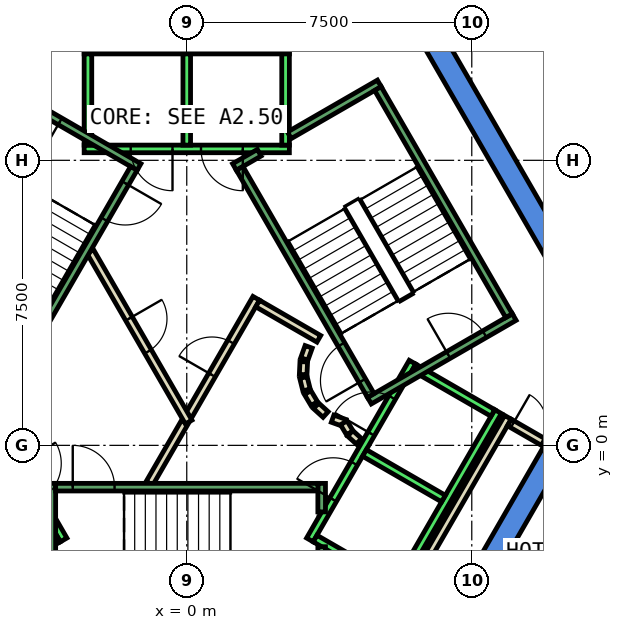
"""IFC4 building model, lengths in metres.
Left out: names, types, materials, properties, quantities, classifications, styles, units other than length and angle.
Written with IfcOpenShell. Run it as: python <this file> out.ifc"""

import sys

from ifc_helpers import new_model, si_unit, direction, frame, frame_2d, origin, place, context, subcontext, project, spatial, polyline, rectangle, outline, extrude, element, fill, save


model = new_model("IFC4")
c1 = context("Model", 3, precision=1e-05, world=origin(), true_north=direction((0.0, 1.0)))
c2 = subcontext(c1, "Body", "Model", "MODEL_VIEW")
j1 = project(units=[si_unit("LENGTHUNIT", "METRE"), si_unit("PLANEANGLEUNIT", "RADIAN")], contexts=[c1])
p1 = place(None, origin())
s1 = spatial("IfcSite", under=j1, at=p1, CompositionType="ELEMENT")
p2 = place(p1, origin())
s2 = spatial("IfcBuilding", under=s1, at=p2, CompositionType="ELEMENT")
p3 = place(p2, frame((0.0, 0.0, 241.4)))
s3 = spatial("IfcBuildingStorey", under=s2, at=p3, CompositionType="ELEMENT", Elevation=241.4)
p4 = place(p3, frame((0.0, 0.0, -0.6)))
e1 = element("IfcWall", 1, at=p4, inside=s3, PredefinedType="SHEAR", context=c2, shape_type="SweptSolid", body=[
    extrude(outline(polyline([(6.786, 10.747), (6.266, 10.447), (10.854, 2.5), (11.547, 2.5), (6.786, 10.747)])), origin(), (0.0, 0.0, 1.0), 3.86),
])
p5 = place(p3, frame((0.0, 0.0, -0.6)))
e2 = element("IfcWall", 2, at=p5, inside=s3, PredefinedType="SHEAR", context=c2, shape_type="SweptSolid", body=[
    extrude(outline(polyline([(5.774, -7.5), (11.547, 2.5), (10.854, 2.5), (5.427, -6.9), (5.774, -7.5)])), origin(), (0.0, 0.0, 1.0), 3.86),
])
p6 = place(p3, frame((8.939, 12.559, 0.0), z_axis=(0.0, 0.0, 1.0), x_axis=(0.517045022441, -0.855958202699, 0.0)))
e3 = element("IfcWall", 3, at=p6, inside=s3, PredefinedType="PARTITIONING", context=c2, shape_type="SweptSolid", body=[
    extrude(rectangle(XDim=3.166, YDim=0.2, at=frame_2d((1.583, 0.0))), origin(), (0.0, 0.0, 1.0), 3.26),
])
p7 = place(p6, frame((1.083, 0.0, 0.0)))
e4 = element("IfcOpeningElement", 4, at=p7, cuts=e3, PredefinedType="OPENING", context=c2, shape_type="SweptSolid", body=[
    extrude(rectangle(XDim=1.0, YDim=2.1, at=frame_2d((0.5, 1.05))), frame((0.0, 0.11, 0.0), z_axis=(0.0, -1.0, 0.0), x_axis=(1.0, 0.0, 0.0)), (0.0, 0.0, 1.0), 0.22),
])
p8 = place(p3, frame((5.751, -3.938, 0.0), z_axis=(0.0, 0.0, 1.0), x_axis=(0.500034260056, 0.866005622828, 0.0)))
e5 = element("IfcWall", 5, at=p8, inside=s3, PredefinedType="PARTITIONING", context=c2, shape_type="SweptSolid", body=[
    extrude(rectangle(XDim=5.399, YDim=0.2, at=frame_2d((2.7, 0.0))), origin(), (0.0, 0.0, 1.0), 3.26),
])
p9 = place(p3, frame((8.488, 0.602, 0.0), z_axis=(0.0, 0.0, 1.0), x_axis=(0.866063652425, -0.499933745558, 0.0)))
e6 = element("IfcWall", 6, at=p9, inside=s3, PredefinedType="PARTITIONING", context=c2, shape_type="SweptSolid", body=[
    extrude(rectangle(XDim=1.1, YDim=0.2, at=frame_2d((0.55, 0.0))), origin(), (0.0, 0.0, 1.0), 3.26),
])
p10 = place(p9, frame((0.1, 0.0, 0.0)))
e7 = element("IfcOpeningElement", 7, at=p10, cuts=e6, PredefinedType="OPENING", context=c2, shape_type="SweptSolid", body=[
    extrude(rectangle(XDim=0.9, YDim=2.1, at=frame_2d((0.45, 1.05))), frame((0.0, 0.11, 0.0), z_axis=(0.0, -1.0, 0.0), x_axis=(1.0, 0.0, 0.0)), (0.0, 0.0, 1.0), 0.22),
])
p11 = place(p3, frame((9.358, -4.692, 0.0), z_axis=(0.0, 0.0, 1.0), x_axis=(0.500027777314, 0.866009365951, 0.0)))
e8 = element("IfcWall", 8, at=p11, inside=s3, PredefinedType="PARTITIONING", context=c2, shape_type="SweptSolid", body=[
    extrude(rectangle(XDim=7.36, YDim=0.15, at=frame_2d((3.68, 0.0))), origin(), (0.0, 0.0, 1.0), 3.26),
])
p12 = place(p3, frame((-0.982, -1.0, 0.0), z_axis=(0.0, 0.0, 1.0), x_axis=(0.50024047865, 0.865886518847, 0.0)))
e9 = element("IfcWall", 9, at=p12, inside=s3, PredefinedType="PARTITIONING", context=c2, shape_type="SweptSolid", body=[
    extrude(rectangle(XDim=1.863, YDim=0.2, at=frame_2d((0.931, 0.0))), origin(), (0.0, 0.0, 1.0), 3.26),
])
p13 = place(p3, frame((0.05, 0.787, 0.0), z_axis=(0.0, 0.0, 1.0), x_axis=(0.499954076797, 0.866051915934, 0.0)))
e10 = element("IfcWall", 10, at=p13, inside=s3, PredefinedType="PARTITIONING", context=c2, shape_type="SweptSolid", body=[
    extrude(rectangle(XDim=3.558, YDim=0.2, at=frame_2d((1.779, 0.0))), origin(), (0.0, 0.0, 1.0), 3.26),
])
p14 = place(p13, frame((1.229, 0.0, 0.0)))
e11 = element("IfcOpeningElement", 11, at=p14, cuts=e10, PredefinedType="OPENING", context=c2, shape_type="SweptSolid", body=[
    extrude(rectangle(XDim=1.0, YDim=2.1, at=frame_2d((0.5, 1.05))), frame((0.0, 0.11, 0.0), z_axis=(0.0, -1.0, 0.0), x_axis=(1.0, 0.0, 0.0)), (0.0, 0.0, 1.0), 0.22),
])
p15 = place(p3, frame((1.866, 3.732, 0.0), z_axis=(0.0, 0.0, 1.0), x_axis=(0.866043361281, -0.499968895414, 0.0)))
e12 = element("IfcWall", 12, at=p15, inside=s3, PredefinedType="PARTITIONING", context=c2, shape_type="SweptSolid", body=[
    extrude(rectangle(XDim=1.858, YDim=0.2, at=frame_2d((0.929, 0.0))), origin(), (0.0, 0.0, 1.0), 3.26),
])
p16 = place(p3, frame((3.208, 2.592, 0.0), z_axis=(0.0, 0.0, 1.0), x_axis=(-0.337388820924, -0.941365382578, 0.0)))
e13 = element("IfcWall", 13, at=p16, inside=s3, PredefinedType="PARTITIONING", context=c2, shape_type="SweptSolid", body=[
    extrude(rectangle(XDim=0.338, YDim=0.2, at=frame_2d((0.169, 0.0))), origin(), (0.0, 0.0, 1.0), 3.26),
])
p17 = place(p3, frame((3.079, 2.199, 0.0), z_axis=(0.0, 0.0, 1.0), x_axis=(-0.047771483479, -0.998858290933, 0.0)))
e14 = element("IfcWall", 14, at=p17, inside=s3, PredefinedType="PARTITIONING", context=c2, shape_type="SweptSolid", body=[
    extrude(rectangle(XDim=0.337, YDim=0.2, at=frame_2d((0.169, 0.0))), origin(), (0.0, 0.0, 1.0), 3.26),
])
p18 = place(p3, frame((3.07, 1.786, 0.0), z_axis=(0.0, 0.0, 1.0), x_axis=(0.242705583207, -0.970099994784, 0.0)))
e15 = element("IfcWall", 15, at=p18, inside=s3, PredefinedType="PARTITIONING", context=c2, shape_type="SweptSolid", body=[
    extrude(rectangle(XDim=0.338, YDim=0.2, at=frame_2d((0.169, 0.0))), origin(), (0.0, 0.0, 1.0), 3.26),
])
for number, where, z_axis, x_axis in (
    (16, (3.182, 1.388, 0.0), (0.0, 0.0, 1.0), (0.512, -0.859, 0.0)),
    (17, (3.404, 1.039, 0.0), (0.0, 0.0, 1.0), (0.74, -0.672, 0.0)),
):
    element("IfcWall", number, at=place(p3, frame(where, z_axis=z_axis, x_axis=x_axis)), inside=s3, PredefinedType="PARTITIONING", context=c2, shape_type="SweptSolid", body=[
        extrude(rectangle(XDim=0.338, YDim=0.2, at=frame_2d((0.169, 0.0))), origin(), (0.0, 0.0, 1.0), 3.26),
    ])
p19 = place(p3, frame((3.838, 0.702, 0.0), z_axis=(0.0, 0.0, 1.0), x_axis=(0.941035081519, -0.338308993895, 0.0)))
e18 = element("IfcWall", 18, at=p19, inside=s3, PredefinedType="PARTITIONING", context=c2, shape_type="SweptSolid", body=[
    extrude(rectangle(XDim=0.337, YDim=0.2, at=frame_2d((0.168, 0.0))), origin(), (0.0, 0.0, 1.0), 3.26),
])
p20 = place(p3, frame((4.132, 0.593, 0.0), z_axis=(0.0, 0.0, 1.0), x_axis=(0.513561617048, -0.858052717201, 0.0)))
e19 = element("IfcWall", 19, at=p20, inside=s3, PredefinedType="PARTITIONING", context=c2, shape_type="SweptSolid", body=[
    extrude(rectangle(XDim=0.308, YDim=0.2, at=frame_2d((0.154, 0.0))), origin(), (0.0, 0.0, 1.0), 3.26),
])
p21 = place(p3, frame((4.301, 0.315, 0.0), z_axis=(0.0, 0.0, 1.0), x_axis=(0.741798017506, -0.670623367639, 0.0)))
e20 = element("IfcWall", 20, at=p21, inside=s3, PredefinedType="PARTITIONING", context=c2, shape_type="SweptSolid", body=[
    extrude(rectangle(XDim=0.309, YDim=0.2, at=frame_2d((0.154, 0.0))), origin(), (0.0, 0.0, 1.0), 3.26),
])
p22 = place(p3, frame((-2.54, 5.1, 0.0), z_axis=(0.0, 0.0, 1.0), x_axis=(0.499925051871, -0.866068670783, 0.0)))
e21 = element("IfcWall", 21, at=p22, inside=s3, PredefinedType="PARTITIONING", context=c2, shape_type="SweptSolid", body=[
    extrude(rectangle(XDim=5.181, YDim=0.2, at=frame_2d((2.59, 0.0))), origin(), (0.0, 0.0, 1.0), 3.26),
])
p23 = place(p22, frame((2.04, 0.0, 0.0)))
e22 = element("IfcOpeningElement", 22, at=p23, cuts=e21, PredefinedType="OPENING", context=c2, shape_type="SweptSolid", body=[
    extrude(rectangle(XDim=1.0, YDim=2.1, at=frame_2d((0.5, 1.05))), frame((0.0, 0.11, 0.0), z_axis=(0.0, -1.0, 0.0), x_axis=(1.0, 0.0, 0.0)), (0.0, 0.0, 1.0), 0.22),
])
p24 = place(p3, frame((2.7, 7.8, 0.0), z_axis=(0.0, 0.0, 1.0), x_axis=(-1.0, 0.0, 0.0)))
e23 = element("IfcWall", 23, at=p24, inside=s3, PredefinedType="STANDARD", context=c2, shape_type="SweptSolid", body=[
    extrude(rectangle(XDim=5.4, YDim=0.2, at=frame_2d((2.7, 0.0))), origin(), (0.0, 0.0, 1.0), 3.26),
])
p25 = place(p24, frame((1.225, 0.0, 0.0)))
e24 = element("IfcOpeningElement", 24, at=p25, cuts=e23, PredefinedType="OPENING", context=c2, shape_type="SweptSolid", body=[
    extrude(rectangle(XDim=1.1, YDim=2.1, at=frame_2d((0.55, 1.05))), frame((0.0, 0.11, 0.0), z_axis=(0.0, -1.0, 0.0), x_axis=(1.0, 0.0, 0.0)), (0.0, 0.0, 1.0), 0.22),
])
p26 = place(p24, frame((3.075, 0.0, 0.0)))
e25 = element("IfcOpeningElement", 25, at=p26, cuts=e23, PredefinedType="OPENING", context=c2, shape_type="SweptSolid", body=[
    extrude(rectangle(XDim=1.1, YDim=2.1, at=frame_2d((0.55, 1.05))), frame((0.0, 0.11, 0.0), z_axis=(0.0, -1.0, 0.0), x_axis=(1.0, 0.0, 0.0)), (0.0, 0.0, 1.0), 0.22),
])
p27 = place(p3, frame((2.7, 10.4, 0.0), z_axis=(0.0, 0.0, 1.0), x_axis=(-1.0, 0.0, 0.0)))
e26 = element("IfcWall", 26, at=p27, inside=s3, PredefinedType="STANDARD", context=c2, shape_type="SweptSolid", body=[
    extrude(rectangle(XDim=5.4, YDim=0.2, at=frame_2d((2.7, 0.0))), origin(), (0.0, 0.0, 1.0), 3.26),
])
for number, where, z_axis, x_axis in (
    (27, (2.6, 7.9, 0.0), (0.0, 0.0, 1.0), (0.0, 1.0, 0.0)),
    (28, (0.0, 7.9, 0.0), (0.0, 0.0, 1.0), (0.0, 1.0, 0.0)),
    (29, (-2.6, 7.9, 0.0), (0.0, 0.0, 1.0), (0.0, 1.0, 0.0)),
):
    element("IfcWall", number, at=place(p3, frame(where, z_axis=z_axis, x_axis=x_axis)), inside=s3, PredefinedType="STANDARD", context=c2, shape_type="SweptSolid", body=[
        extrude(rectangle(XDim=2.4, YDim=0.2, at=frame_2d((1.2, 0.0))), origin(), (0.0, 0.0, 1.0), 3.26),
    ])
p28 = place(p3, frame((-5.94, 2.188, 0.0), z_axis=(0.0, 0.0, 1.0), x_axis=(0.500034260056, -0.866005622828, 0.0)))
e30 = element("IfcWall", 30, at=p28, inside=s3, PredefinedType="STANDARD", context=c2, shape_type="SweptSolid", body=[
    extrude(rectangle(XDim=5.399, YDim=0.2, at=frame_2d((2.7, 0.0))), origin(), (0.0, 0.0, 1.0), 3.26),
])
p29 = place(p28, frame((3.075, 0.0, 0.0)))
e31 = element("IfcOpeningElement", 31, at=p29, cuts=e30, PredefinedType="OPENING", context=c2, shape_type="SweptSolid", body=[
    extrude(rectangle(XDim=1.1, YDim=2.1, at=frame_2d((0.55, 1.05))), frame((0.0, 0.11, 0.0), z_axis=(0.0, -1.0, 0.0), x_axis=(1.0, 0.0, 0.0)), (0.0, 0.0, 1.0), 0.22),
])
p30 = place(p28, frame((1.225, 0.0, 0.0)))
e32 = element("IfcOpeningElement", 32, at=p30, cuts=e30, PredefinedType="OPENING", context=c2, shape_type="SweptSolid", body=[
    extrude(rectangle(XDim=1.1, YDim=2.1, at=frame_2d((0.55, 1.05))), frame((0.0, 0.11, 0.0), z_axis=(0.0, -1.0, 0.0), x_axis=(1.0, 0.0, 0.0)), (0.0, 0.0, 1.0), 0.22),
])
p31 = place(p3, frame((-3.377, -2.452, 0.0), z_axis=(0.0, 0.0, 1.0), x_axis=(-0.865955154139, -0.50012165622, 0.0)))
e33 = element("IfcWall", 33, at=p31, inside=s3, PredefinedType="STANDARD", context=c2, shape_type="SweptSolid", body=[
    extrude(rectangle(XDim=2.4, YDim=0.2, at=frame_2d((1.2, 0.0))), origin(), (0.0, 0.0, 1.0), 3.26),
])
p32 = place(p3, frame((3.24, -2.488, 0.0), z_axis=(0.0, 0.0, 1.0), x_axis=(0.500034260056, 0.866005622828, 0.0)))
e34 = element("IfcWall", 34, at=p32, inside=s3, PredefinedType="STANDARD", context=c2, shape_type="SweptSolid", body=[
    extrude(rectangle(XDim=5.399, YDim=0.2, at=frame_2d((2.7, 0.0))), origin(), (0.0, 0.0, 1.0), 3.26),
])
p33 = place(p32, frame((3.225, 0.0, 0.0)))
e35 = element("IfcOpeningElement", 35, at=p33, cuts=e34, PredefinedType="OPENING", context=c2, shape_type="SweptSolid", body=[
    extrude(rectangle(XDim=1.1, YDim=2.1, at=frame_2d((0.55, 1.05))), frame((0.0, 0.11, 0.0), z_axis=(0.0, -1.0, 0.0), x_axis=(1.0, 0.0, 0.0)), (0.0, 0.0, 1.0), 0.22),
])
p34 = place(p32, frame((1.225, 0.0, 0.0)))
e36 = element("IfcOpeningElement", 36, at=p34, cuts=e34, PredefinedType="OPENING", context=c2, shape_type="SweptSolid", body=[
    extrude(rectangle(XDim=1.1, YDim=2.1, at=frame_2d((0.55, 1.05))), frame((0.0, 0.11, 0.0), z_axis=(0.0, -1.0, 0.0), x_axis=(1.0, 0.0, 0.0)), (0.0, 0.0, 1.0), 0.22),
])
p35 = place(p3, frame((5.492, -3.788, 0.0), z_axis=(0.0, 0.0, 1.0), x_axis=(0.500034260056, 0.866005622828, 0.0)))
e37 = element("IfcWall", 37, at=p35, inside=s3, PredefinedType="STANDARD", context=c2, shape_type="SweptSolid", body=[
    extrude(rectangle(XDim=5.399, YDim=0.2, at=frame_2d((2.7, 0.0))), origin(), (0.0, 0.0, 1.0), 3.26),
])
p36 = place(p3, frame((3.377, -2.452, 0.0), z_axis=(0.0, 0.0, 1.0), x_axis=(0.865955154139, -0.50012165622, 0.0)))
e38 = element("IfcWall", 38, at=p36, inside=s3, PredefinedType="STANDARD", context=c2, shape_type="SweptSolid", body=[
    extrude(rectangle(XDim=2.4, YDim=0.2, at=frame_2d((1.2, 0.0))), origin(), (0.0, 0.0, 1.0), 3.26),
])
for number, where, z_axis, x_axis in (
    (39, (4.677, -0.2, 0.0), (0.0, 0.0, 1.0), (0.866, -0.5, 0.0)),
    (40, (5.977, 2.052, 0.0), (0.0, 0.0, 1.0), (0.866, -0.5, 0.0)),
):
    element("IfcWall", number, at=place(p3, frame(where, z_axis=z_axis, x_axis=x_axis)), inside=s3, PredefinedType="STANDARD", context=c2, shape_type="SweptSolid", body=[
        extrude(rectangle(XDim=2.399, YDim=0.2, at=frame_2d((1.2, 0.0))), origin(), (0.0, 0.0, 1.0), 3.26),
    ])
p37 = place(p3, frame((-3.55, -1.0, 0.0), z_axis=(0.0, 0.0, 1.0), x_axis=(0.0, -1.0, 0.0)))
e41 = element("IfcWall", 41, at=p37, inside=s3, PredefinedType="STANDARD", context=c2, shape_type="SweptSolid", body=[
    extrude(rectangle(XDim=4.4, YDim=0.2, at=frame_2d((2.2, 0.0))), origin(), (0.0, 0.0, 1.0), 3.26),
])
p38 = place(p37, frame((2.4, 0.0, 0.0)))
e42 = element("IfcOpeningElement", 42, at=p38, cuts=e41, PredefinedType="OPENING", context=c2, shape_type="SweptSolid", body=[
    extrude(rectangle(XDim=1.1, YDim=2.2, at=frame_2d((0.55, 1.1))), frame((0.0, 0.11, 0.0), z_axis=(0.0, -1.0, 0.0), x_axis=(1.0, 0.0, 0.0)), (0.0, 0.0, 1.0), 0.22),
])
p39 = place(p3, frame((3.55, -2.667, 0.0), z_axis=(0.0, 0.0, 1.0), x_axis=(0.0, -1.0, 0.0)))
e43 = element("IfcWall", 43, at=p39, inside=s3, PredefinedType="STANDARD", context=c2, shape_type="SweptSolid", body=[
    extrude(rectangle(XDim=2.733, YDim=0.2, at=frame_2d((1.366, 0.0))), origin(), (0.0, 0.0, 1.0), 3.26),
])
p40 = place(p3, frame((3.55, -1.0, 0.0), z_axis=(0.0, 0.0, 1.0), x_axis=(0.0, -1.0, 0.0)))
e44 = element("IfcWall", 44, at=p40, inside=s3, PredefinedType="STANDARD", context=c2, shape_type="SweptSolid", body=[
    extrude(rectangle(XDim=0.751, YDim=0.2, at=frame_2d((0.375, 0.0))), origin(), (0.0, 0.0, 1.0), 3.26),
])
p41 = place(p3, frame((-3.45, -1.1, 0.0), z_axis=(0.0, 0.0, 1.0), x_axis=(1.0, 0.0, 0.0)))
e45 = element("IfcWall", 45, at=p41, inside=s3, PredefinedType="STANDARD", context=c2, shape_type="SweptSolid", body=[
    extrude(rectangle(XDim=6.9, YDim=0.2, at=frame_2d((3.45, 0.0))), origin(), (0.0, 0.0, 1.0), 3.26),
])
p42 = place(p41, frame((0.45, 0.0, 0.0)))
e46 = element("IfcOpeningElement", 46, at=p42, cuts=e45, PredefinedType="OPENING", context=c2, shape_type="SweptSolid", body=[
    extrude(rectangle(XDim=1.1, YDim=2.2, at=frame_2d((0.55, 1.1))), frame((0.0, 0.11, 0.0), z_axis=(0.0, -1.0, 0.0), x_axis=(1.0, 0.0, 0.0)), (0.0, 0.0, 1.0), 0.22),
])
p43 = place(p3, frame((4.806, 1.176, 0.0), z_axis=(0.0, 0.0, 1.0), x_axis=(0.866059941101, 0.499940174841, 0.0)))
e47 = element("IfcWall", 47, at=p43, inside=s3, PredefinedType="STANDARD", context=c2, shape_type="SweptSolid", body=[
    extrude(rectangle(XDim=4.4, YDim=0.2, at=frame_2d((2.2, 0.0))), origin(), (0.0, 0.0, 1.0), 3.26),
])
p44 = place(p43, frame((2.4, 0.0, 0.0)))
e48 = element("IfcOpeningElement", 48, at=p44, cuts=e47, PredefinedType="OPENING", context=c2, shape_type="SweptSolid", body=[
    extrude(rectangle(XDim=1.1, YDim=2.2, at=frame_2d((0.55, 1.1))), frame((0.0, 0.11, 0.0), z_axis=(0.0, -1.0, 0.0), x_axis=(1.0, 0.0, 0.0)), (0.0, 0.0, 1.0), 0.22),
])
p45 = place(p3, frame((2.7, 8.158, 0.0), z_axis=(0.0, 0.0, 1.0), x_axis=(0.86611865017, 0.499838457731, 0.0)))
e49 = element("IfcWall", 49, at=p45, inside=s3, PredefinedType="STANDARD", context=c2, shape_type="SweptSolid", body=[
    extrude(rectangle(XDim=2.733, YDim=0.2, at=frame_2d((1.366, 0.0))), origin(), (0.0, 0.0, 1.0), 3.26),
])
p46 = place(p3, frame((1.256, 7.324, 0.0), z_axis=(0.0, 0.0, 1.0), x_axis=(0.865915093549, 0.500191014278, 0.0)))
e50 = element("IfcWall", 50, at=p46, inside=s3, PredefinedType="STANDARD", context=c2, shape_type="SweptSolid", body=[
    extrude(rectangle(XDim=0.752, YDim=0.2, at=frame_2d((0.376, 0.0))), origin(), (0.0, 0.0, 1.0), 3.26),
])
p47 = place(p3, frame((4.843, 1.312, 0.0), z_axis=(0.0, 0.0, 1.0), x_axis=(-0.499963383562, 0.866046543262, 0.0)))
e51 = element("IfcWall", 51, at=p47, inside=s3, PredefinedType="STANDARD", context=c2, shape_type="SweptSolid", body=[
    extrude(rectangle(XDim=6.9, YDim=0.2, at=frame_2d((3.45, 0.0))), origin(), (0.0, 0.0, 1.0), 3.26),
])
p48 = place(p47, frame((0.45, 0.0, 0.0)))
e52 = element("IfcOpeningElement", 52, at=p48, cuts=e51, PredefinedType="OPENING", context=c2, shape_type="SweptSolid", body=[
    extrude(rectangle(XDim=1.1, YDim=2.2, at=frame_2d((0.55, 1.1))), frame((0.0, 0.11, 0.0), z_axis=(0.0, -1.0, 0.0), x_axis=(1.0, 0.0, 0.0)), (0.0, 0.0, 1.0), 0.22),
])
p49 = place(p3, frame((8.48, 3.412, 0.0), z_axis=(0.0, 0.0, 1.0), x_axis=(-0.499978703459, 0.866037698999, 0.0)))
e53 = element("IfcWall", 53, at=p49, inside=s3, PredefinedType="STANDARD", context=c2, shape_type="SweptSolid", body=[
    extrude(rectangle(XDim=6.9, YDim=0.2, at=frame_2d((3.45, 0.0))), origin(), (0.0, 0.0, 1.0), 3.26),
])
p50 = place(p3, frame((-1.256, 7.324, 0.0), z_axis=(0.0, 0.0, 1.0), x_axis=(-0.866046073146, 0.499964197906, 0.0)))
e54 = element("IfcWall", 54, at=p50, inside=s3, PredefinedType="STANDARD", context=c2, shape_type="SweptSolid", body=[
    extrude(rectangle(XDim=4.4, YDim=0.2, at=frame_2d((2.2, 0.0))), origin(), (0.0, 0.0, 1.0), 3.26),
])
p51 = place(p50, frame((2.4, 0.0, 0.0)))
e55 = element("IfcOpeningElement", 55, at=p51, cuts=e54, PredefinedType="OPENING", context=c2, shape_type="SweptSolid", body=[
    extrude(rectangle(XDim=1.1, YDim=2.2, at=frame_2d((0.55, 1.1))), frame((0.0, 0.11, 0.0), z_axis=(0.0, -1.0, 0.0), x_axis=(1.0, 0.0, 0.0)), (0.0, 0.0, 1.0), 0.22),
])
p52 = place(p3, frame((-1.393, 7.288, 0.0), z_axis=(0.0, 0.0, 1.0), x_axis=(-0.499963383562, -0.866046543262, 0.0)))
e56 = element("IfcWall", 56, at=p52, inside=s3, PredefinedType="STANDARD", context=c2, shape_type="SweptSolid", body=[
    extrude(rectangle(XDim=6.9, YDim=0.2, at=frame_2d((3.45, 0.0))), origin(), (0.0, 0.0, 1.0), 3.26),
])
p53 = place(p52, frame((0.45, 0.0, 0.0)))
e57 = element("IfcOpeningElement", 57, at=p53, cuts=e56, PredefinedType="OPENING", context=c2, shape_type="SweptSolid", body=[
    extrude(rectangle(XDim=1.1, YDim=2.2, at=frame_2d((0.55, 1.1))), frame((0.0, 0.11, 0.0), z_axis=(0.0, -1.0, 0.0), x_axis=(1.0, 0.0, 0.0)), (0.0, 0.0, 1.0), 0.22),
])
p54 = place(p14, origin())
e58 = element("IfcDoor", 58, at=p54, inside=s3, OperationType="SINGLE_SWING_RIGHT", PredefinedType="DOOR", context=c2, shape_type="SweptSolid", body=[
    extrude(rectangle(XDim=1.0, YDim=2.1, at=frame_2d((0.5, 1.05))), frame((0.0, 0.025, 0.0), z_axis=(0.0, -1.0, 0.0), x_axis=(1.0, 0.0, 0.0)), (0.0, 0.0, 1.0), 0.05),
])
fill(e11, e58)
p55 = place(p23, origin())
e59 = element("IfcDoor", 59, at=p55, inside=s3, OperationType="SINGLE_SWING_RIGHT", PredefinedType="DOOR", context=c2, shape_type="SweptSolid", body=[
    extrude(rectangle(XDim=1.0, YDim=2.1, at=frame_2d((0.5, 1.05))), frame((0.0, 0.025, 0.0), z_axis=(0.0, -1.0, 0.0), x_axis=(1.0, 0.0, 0.0)), (0.0, 0.0, 1.0), 0.05),
])
fill(e22, e59)
p56 = place(p10, origin())
e60 = element("IfcDoor", 60, at=p56, inside=s3, OperationType="SINGLE_SWING_RIGHT", PredefinedType="DOOR", context=c2, shape_type="SweptSolid", body=[
    extrude(rectangle(XDim=0.9, YDim=2.1, at=frame_2d((0.45, 1.05))), frame((0.0, 0.025, 0.0), z_axis=(0.0, -1.0, 0.0), x_axis=(1.0, 0.0, 0.0)), (0.0, 0.0, 1.0), 0.05),
])
fill(e7, e60)
p57 = place(p25, origin())
e61 = element("IfcDoor", 61, at=p57, inside=s3, OperationType="SLIDING_TO_LEFT", PredefinedType="DOOR", context=c2, shape_type="SweptSolid", body=[
    extrude(rectangle(XDim=1.1, YDim=2.1, at=frame_2d((0.55, 1.05))), frame((0.0, 0.025, 0.0), z_axis=(0.0, -1.0, 0.0), x_axis=(1.0, 0.0, 0.0)), (0.0, 0.0, 1.0), 0.05),
])
fill(e24, e61)
p58 = place(p26, origin())
e62 = element("IfcDoor", 62, at=p58, inside=s3, OperationType="SLIDING_TO_LEFT", PredefinedType="DOOR", context=c2, shape_type="SweptSolid", body=[
    extrude(rectangle(XDim=1.1, YDim=2.1, at=frame_2d((0.55, 1.05))), frame((0.0, 0.025, 0.0), z_axis=(0.0, -1.0, 0.0), x_axis=(1.0, 0.0, 0.0)), (0.0, 0.0, 1.0), 0.05),
])
fill(e25, e62)
p59 = place(p33, origin())
e63 = element("IfcDoor", 63, at=p59, inside=s3, OperationType="SLIDING_TO_LEFT", PredefinedType="DOOR", context=c2, shape_type="SweptSolid", body=[
    extrude(rectangle(XDim=1.1, YDim=2.1, at=frame_2d((0.55, 1.05))), frame((0.0, 0.025, 0.0), z_axis=(0.0, -1.0, 0.0), x_axis=(1.0, 0.0, 0.0)), (0.0, 0.0, 1.0), 0.05),
])
fill(e35, e63)
p60 = place(p34, origin())
e64 = element("IfcDoor", 64, at=p60, inside=s3, OperationType="SLIDING_TO_LEFT", PredefinedType="DOOR", context=c2, shape_type="SweptSolid", body=[
    extrude(rectangle(XDim=1.1, YDim=2.1, at=frame_2d((0.55, 1.05))), frame((0.0, 0.025, 0.0), z_axis=(0.0, -1.0, 0.0), x_axis=(1.0, 0.0, 0.0)), (0.0, 0.0, 1.0), 0.05),
])
fill(e36, e64)
p61 = place(p42, origin())
e65 = element("IfcDoor", 65, at=p61, inside=s3, OperationType="SINGLE_SWING_LEFT", PredefinedType="DOOR", context=c2, shape_type="SweptSolid", body=[
    extrude(rectangle(XDim=1.1, YDim=2.2, at=frame_2d((0.55, 1.1))), frame((0.0, 0.025, 0.0), z_axis=(0.0, -1.0, 0.0), x_axis=(1.0, 0.0, 0.0)), (0.0, 0.0, 1.0), 0.05),
])
fill(e46, e65)
p62 = place(p48, origin())
e66 = element("IfcDoor", 66, at=p62, inside=s3, OperationType="SINGLE_SWING_LEFT", PredefinedType="DOOR", context=c2, shape_type="SweptSolid", body=[
    extrude(rectangle(XDim=1.1, YDim=2.2, at=frame_2d((0.55, 1.1))), frame((0.0, 0.025, 0.0), z_axis=(0.0, -1.0, 0.0), x_axis=(1.0, 0.0, 0.0)), (0.0, 0.0, 1.0), 0.05),
])
fill(e52, e66)
p63 = place(p44, origin())
e67 = element("IfcDoor", 67, at=p63, inside=s3, OperationType="SINGLE_SWING_LEFT", PredefinedType="DOOR", context=c2, shape_type="SweptSolid", body=[
    extrude(rectangle(XDim=1.1, YDim=2.2, at=frame_2d((0.55, 1.1))), frame((0.0, 0.025, 0.0), z_axis=(0.0, -1.0, 0.0), x_axis=(1.0, 0.0, 0.0)), (0.0, 0.0, 1.0), 0.05),
])
fill(e48, e67)
p64 = place(p53, origin())
e68 = element("IfcDoor", 68, at=p64, inside=s3, OperationType="SINGLE_SWING_LEFT", PredefinedType="DOOR", context=c2, shape_type="SweptSolid", body=[
    extrude(rectangle(XDim=1.1, YDim=2.2, at=frame_2d((0.55, 1.1))), frame((0.0, 0.025, 0.0), z_axis=(0.0, -1.0, 0.0), x_axis=(1.0, 0.0, 0.0)), (0.0, 0.0, 1.0), 0.05),
])
fill(e57, e68)
p65 = place(p51, origin())
e69 = element("IfcDoor", 69, at=p65, inside=s3, OperationType="SINGLE_SWING_LEFT", PredefinedType="DOOR", context=c2, shape_type="SweptSolid", body=[
    extrude(rectangle(XDim=1.1, YDim=2.2, at=frame_2d((0.55, 1.1))), frame((0.0, 0.025, 0.0), z_axis=(0.0, -1.0, 0.0), x_axis=(1.0, 0.0, 0.0)), (0.0, 0.0, 1.0), 0.05),
])
fill(e55, e69)
save(model, sys.argv[1])
